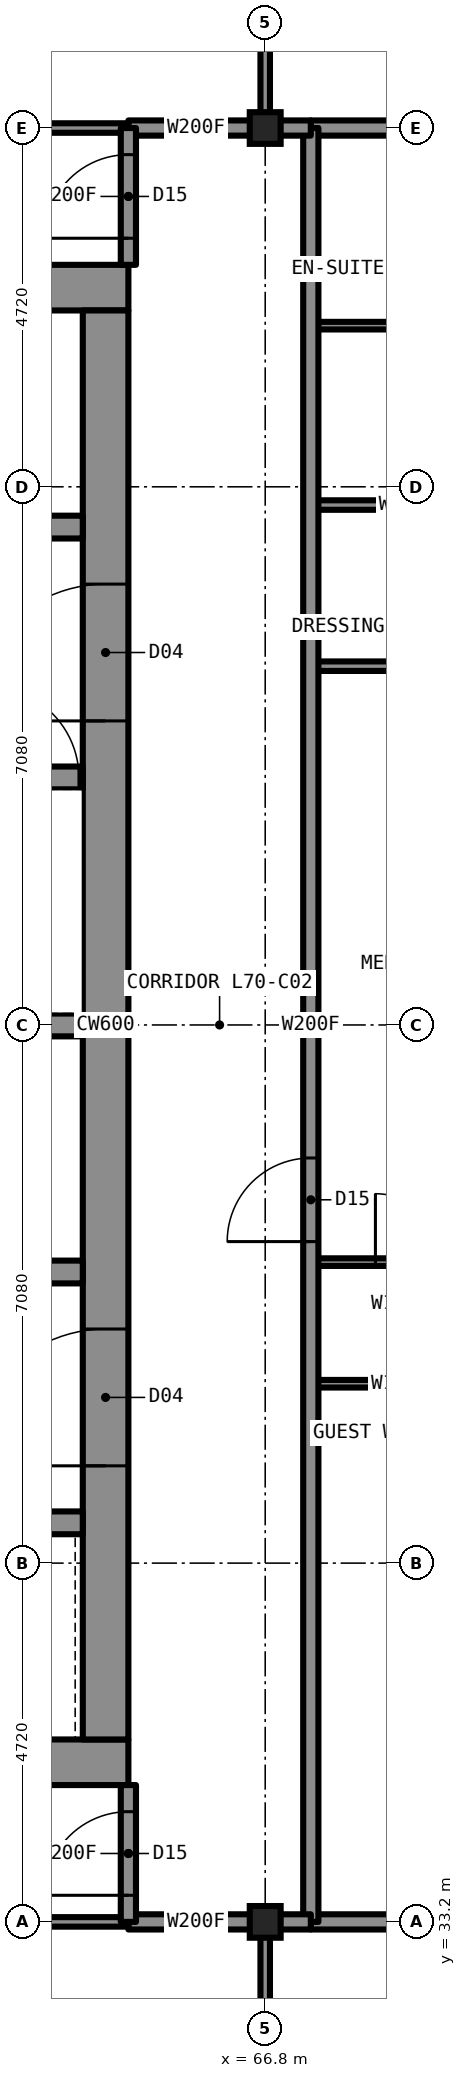
"""IFC4 building model, lengths in metres.
Left out: names, types, materials, properties, quantities, classifications, styles, units other than length and angle.
Written with IfcOpenShell. Run it as: python <this file> out.ifc"""

import sys

from ifc_helpers import new_model, si_unit, direction, frame, frame_2d, origin, origin_2d, place, context, subcontext, project, spatial, rectangle, i_section, extrude, element, fill, save


model = new_model("IFC4")
c1 = context("Model", 3, precision=1e-05, world=origin(), true_north=direction((0.0, 1.0)))
c2 = subcontext(c1, "Body", "Model", "MODEL_VIEW")
j1 = project(units=[si_unit("LENGTHUNIT", "METRE"), si_unit("PLANEANGLEUNIT", "RADIAN")], contexts=[c1])
p1 = place(None, origin())
s1 = spatial("IfcSite", under=j1, at=p1, CompositionType="ELEMENT")
p2 = place(p1, origin())
s2 = spatial("IfcBuilding", under=s1, at=p2, CompositionType="ELEMENT")
p3 = place(p2, frame((0.0, 0.0, 254.7)))
s3 = spatial("IfcBuildingStorey", under=s2, at=p3, CompositionType="ELEMENT", Elevation=254.7)
for number, where, z_axis, x_axis in (
    (1, (66.8, 33.2, 0.0), (0.0, 0.0, 1.0), (1.0, 0.0, 0.0)),
    (2, (66.8, 56.8, 0.0), (0.0, 0.0, 1.0), (1.0, 0.0, 0.0)),
):
    element("IfcColumn", number, at=place(p3, frame(where, z_axis=z_axis, x_axis=x_axis)), inside=s3, PredefinedType="COLUMN", context=c2, shape_type="SweptSolid", body=[
        extrude(i_section(OverallWidth=0.406, OverallDepth=0.417, WebThickness=0.03, FlangeThickness=0.048, at=origin_2d()), origin(), (0.0, 0.0, 1.0), 3.5),
    ])
for number, where, z_axis, x_axis in (
    (3, (45.0, 54.7, 0.0), (0.0, 0.0, 1.0), (1.0, 0.0, 0.0)),
    (4, (45.0, 35.3, 0.0), (0.0, 0.0, 1.0), (1.0, 0.0, 0.0)),
):
    element("IfcWall", number, at=place(p3, frame(where, z_axis=z_axis, x_axis=x_axis)), inside=s3, PredefinedType="SHEAR", context=c2, shape_type="SweptSolid", body=[
        extrude(rectangle(XDim=20.0, YDim=0.6, at=frame_2d((10.0, 0.0))), origin(), (0.0, 0.0, 1.0), 3.5),
    ])
p4 = place(p3, frame((64.7, 35.6, 0.0), z_axis=(0.0, 0.0, 1.0), x_axis=(0.0, 1.0, 0.0)))
e5 = element("IfcWall", 5, at=p4, inside=s3, PredefinedType="SHEAR", context=c2, shape_type="SweptSolid", body=[
    extrude(rectangle(XDim=18.8, YDim=0.6, at=frame_2d((9.4, 0.0))), origin(), (0.0, 0.0, 1.0), 3.5),
])
p5 = place(p4, frame((13.4, 0.0, 0.0)))
e6 = element("IfcOpeningElement", 6, at=p5, cuts=e5, PredefinedType="OPENING", context=c2, shape_type="SweptSolid", body=[
    extrude(rectangle(XDim=1.8, YDim=2.2, at=frame_2d((0.9, 1.1))), frame((0.0, 0.31, 0.0), z_axis=(0.0, -1.0, 0.0), x_axis=(1.0, 0.0, 0.0)), (0.0, 0.0, 1.0), 0.62),
])
p6 = place(p4, frame((3.6, 0.0, 0.0)))
e7 = element("IfcOpeningElement", 7, at=p6, cuts=e5, PredefinedType="OPENING", context=c2, shape_type="SweptSolid", body=[
    extrude(rectangle(XDim=1.8, YDim=2.2, at=frame_2d((0.9, 1.1))), frame((0.0, 0.31, 0.0), z_axis=(0.0, -1.0, 0.0), x_axis=(1.0, 0.0, 0.0)), (0.0, 0.0, 1.0), 0.62),
])
p7 = place(p3, frame((45.6, 51.55, 0.0), z_axis=(0.0, 0.0, 1.0), x_axis=(1.0, 0.0, 0.0)))
e8 = element("IfcWall", 8, at=p7, inside=s3, PredefinedType="SHEAR", context=c2, shape_type="SweptSolid", body=[
    extrude(rectangle(XDim=18.8, YDim=0.3, at=frame_2d((9.4, 0.0))), origin(), (0.0, 0.0, 1.0), 3.5),
])
p8 = place(p7, frame((4.8, 0.0, 0.0)))
e9 = element("IfcOpeningElement", 9, at=p8, cuts=e8, PredefinedType="OPENING", context=c2, shape_type="SweptSolid", body=[
    extrude(rectangle(XDim=1.0, YDim=2.1, at=frame_2d((0.5, 1.05))), frame((0.0, 0.16, 0.0), z_axis=(0.0, -1.0, 0.0), x_axis=(1.0, 0.0, 0.0)), (0.0, 0.0, 1.0), 0.32),
])
p9 = place(p7, frame((11.6, 0.0, 0.0)))
e10 = element("IfcOpeningElement", 10, at=p9, cuts=e8, PredefinedType="OPENING", context=c2, shape_type="SweptSolid", body=[
    extrude(rectangle(XDim=1.1, YDim=2.2, at=frame_2d((0.55, 1.1))), frame((0.0, 0.16, 0.0), z_axis=(0.0, -1.0, 0.0), x_axis=(1.0, 0.0, 0.0)), (0.0, 0.0, 1.0), 0.32),
])
p10 = place(p7, frame((14.3, 0.0, 0.0)))
e11 = element("IfcOpeningElement", 11, at=p10, cuts=e8, PredefinedType="OPENING", context=c2, shape_type="SweptSolid", body=[
    extrude(rectangle(XDim=1.1, YDim=2.2, at=frame_2d((0.55, 1.1))), frame((0.0, 0.16, 0.0), z_axis=(0.0, -1.0, 0.0), x_axis=(1.0, 0.0, 0.0)), (0.0, 0.0, 1.0), 0.32),
])
p11 = place(p3, frame((45.6, 38.45, 0.0), z_axis=(0.0, 0.0, 1.0), x_axis=(1.0, 0.0, 0.0)))
e12 = element("IfcWall", 12, at=p11, inside=s3, PredefinedType="SHEAR", context=c2, shape_type="SweptSolid", body=[
    extrude(rectangle(XDim=18.8, YDim=0.3, at=frame_2d((9.4, 0.0))), origin(), (0.0, 0.0, 1.0), 3.5),
])
p12 = place(p11, frame((0.7, 0.0, 0.0)))
e13 = element("IfcOpeningElement", 13, at=p12, cuts=e12, PredefinedType="OPENING", context=c2, shape_type="SweptSolid", body=[
    extrude(rectangle(XDim=1.1, YDim=2.2, at=frame_2d((0.55, 1.1))), frame((0.0, 0.16, 0.0), z_axis=(0.0, -1.0, 0.0), x_axis=(1.0, 0.0, 0.0)), (0.0, 0.0, 1.0), 0.32),
])
p13 = place(p11, frame((3.4, 0.0, 0.0)))
e14 = element("IfcOpeningElement", 14, at=p13, cuts=e12, PredefinedType="OPENING", context=c2, shape_type="SweptSolid", body=[
    extrude(rectangle(XDim=1.1, YDim=2.2, at=frame_2d((0.55, 1.1))), frame((0.0, 0.16, 0.0), z_axis=(0.0, -1.0, 0.0), x_axis=(1.0, 0.0, 0.0)), (0.0, 0.0, 1.0), 0.32),
])
p14 = place(p11, frame((6.1, 0.0, 0.0)))
e15 = element("IfcOpeningElement", 15, at=p14, cuts=e12, PredefinedType="OPENING", context=c2, shape_type="SweptSolid", body=[
    extrude(rectangle(XDim=1.1, YDim=2.2, at=frame_2d((0.55, 1.1))), frame((0.0, 0.16, 0.0), z_axis=(0.0, -1.0, 0.0), x_axis=(1.0, 0.0, 0.0)), (0.0, 0.0, 1.0), 0.32),
])
p15 = place(p11, frame((8.8, 0.0, 0.0)))
e16 = element("IfcOpeningElement", 16, at=p15, cuts=e12, PredefinedType="OPENING", context=c2, shape_type="SweptSolid", body=[
    extrude(rectangle(XDim=1.1, YDim=2.2, at=frame_2d((0.55, 1.1))), frame((0.0, 0.16, 0.0), z_axis=(0.0, -1.0, 0.0), x_axis=(1.0, 0.0, 0.0)), (0.0, 0.0, 1.0), 0.32),
])
p16 = place(p3, frame((56.2, 48.25, 0.0), z_axis=(0.0, 0.0, 1.0), x_axis=(1.0, 0.0, 0.0)))
e17 = element("IfcWall", 17, at=p16, inside=s3, PredefinedType="SHEAR", context=c2, shape_type="SweptSolid", body=[
    extrude(rectangle(XDim=8.2, YDim=0.3, at=frame_2d((4.1, 0.0))), origin(), (0.0, 0.0, 1.0), 3.5),
])
p17 = place(p16, frame((6.95, 0.0, 0.0)))
e18 = element("IfcOpeningElement", 18, at=p17, cuts=e17, PredefinedType="OPENING", context=c2, shape_type="SweptSolid", body=[
    extrude(rectangle(XDim=1.2, YDim=2.2, at=frame_2d((0.6, 1.1))), frame((0.0, 0.16, 0.0), z_axis=(0.0, -1.0, 0.0), x_axis=(1.0, 0.0, 0.0)), (0.0, 0.0, 1.0), 0.32),
])
p18 = place(p3, frame((56.2, 41.75, 0.0), z_axis=(0.0, 0.0, 1.0), x_axis=(1.0, 0.0, 0.0)))
e19 = element("IfcWall", 19, at=p18, inside=s3, PredefinedType="SHEAR", context=c2, shape_type="SweptSolid", body=[
    extrude(rectangle(XDim=8.2, YDim=0.3, at=frame_2d((4.1, 0.0))), origin(), (0.0, 0.0, 1.0), 3.5),
])
p19 = place(p18, frame((3.3, 0.0, 0.0)))
e20 = element("IfcOpeningElement", 20, at=p19, cuts=e19, PredefinedType="OPENING", context=c2, shape_type="SweptSolid", body=[
    extrude(rectangle(XDim=1.0, YDim=2.1, at=frame_2d((0.5, 1.05))), frame((0.0, 0.16, 0.0), z_axis=(0.0, -1.0, 0.0), x_axis=(1.0, 0.0, 0.0)), (0.0, 0.0, 1.0), 0.32),
])
p20 = place(p3, frame((56.5, 45.0, 0.0), z_axis=(0.0, 0.0, 1.0), x_axis=(1.0, 0.0, 0.0)))
e21 = element("IfcWall", 21, at=p20, inside=s3, PredefinedType="SHEAR", context=c2, shape_type="SweptSolid", body=[
    extrude(rectangle(XDim=7.9, YDim=0.3, at=frame_2d((3.95, 0.0))), origin(), (0.0, 0.0, 1.0), 3.5),
])
p21 = place(p3, frame((65.0, 33.2, 0.0), z_axis=(0.0, 0.0, 1.0), x_axis=(1.0, 0.0, 0.0)))
e22 = element("IfcWall", 22, at=p21, inside=s3, PredefinedType="PARTITIONING", context=c2, shape_type="SweptSolid", body=[
    extrude(rectangle(XDim=1.78, YDim=0.2, at=frame_2d((0.89, 0.0))), origin(), (0.0, 0.0, 1.0), 3.33),
])
p22 = place(p3, frame((67.4, 33.2, 0.0), z_axis=(0.0, 0.0, 1.0), x_axis=(1.0, 0.0, 0.0)))
e23 = element("IfcWall", 23, at=p22, inside=s3, PredefinedType="PARTITIONING", context=c2, shape_type="SweptSolid", body=[
    extrude(rectangle(XDim=5.3, YDim=0.2, at=frame_2d((2.65, 0.0))), origin(), (0.0, 0.0, 1.0), 2.573),
])
p23 = place(p3, frame((62.08, 33.2, 0.0), z_axis=(0.0, 0.0, 1.0), x_axis=(1.0, 0.0, 0.0)))
e24 = element("IfcWall", 24, at=p23, inside=s3, PredefinedType="PARTITIONING", context=c2, shape_type="SweptSolid", body=[
    extrude(rectangle(XDim=2.92, YDim=0.125, at=frame_2d((1.46, 0.0))), origin(), (0.0, 0.0, 1.0), 3.33),
])
p24 = place(p3, frame((67.4, 41.88, 0.0), z_axis=(0.0, 0.0, 1.0), x_axis=(1.0, 0.0, 0.0)))
e25 = element("IfcWall", 25, at=p24, inside=s3, PredefinedType="PARTITIONING", context=c2, shape_type="SweptSolid", body=[
    extrude(rectangle(XDim=2.2, YDim=0.1, at=frame_2d((1.1, 0.0))), origin(), (0.0, 0.0, 1.0), 3.33),
])
p25 = place(p24, frame((0.85, 0.0, 0.0)))
e26 = element("IfcOpeningElement", 26, at=p25, cuts=e25, PredefinedType="OPENING", context=c2, shape_type="SweptSolid", body=[
    extrude(rectangle(XDim=0.9, YDim=2.1, at=frame_2d((0.45, 1.05))), frame((0.0, 0.06, 0.0), z_axis=(0.0, -1.0, 0.0), x_axis=(1.0, 0.0, 0.0)), (0.0, 0.0, 1.0), 0.12),
])
p26 = place(p3, frame((67.4, 40.28, 0.0), z_axis=(0.0, 0.0, 1.0), x_axis=(1.0, 0.0, 0.0)))
e27 = element("IfcWall", 27, at=p26, inside=s3, PredefinedType="PARTITIONING", context=c2, shape_type="SweptSolid", body=[
    extrude(rectangle(XDim=2.2, YDim=0.1, at=frame_2d((1.1, 0.0))), origin(), (0.0, 0.0, 1.0), 2.797),
])
p27 = place(p3, frame((65.0, 56.8, 0.0), z_axis=(0.0, 0.0, 1.0), x_axis=(1.0, 0.0, 0.0)))
e28 = element("IfcWall", 28, at=p27, inside=s3, PredefinedType="PARTITIONING", context=c2, shape_type="SweptSolid", body=[
    extrude(rectangle(XDim=1.78, YDim=0.2, at=frame_2d((0.89, 0.0))), origin(), (0.0, 0.0, 1.0), 3.33),
])
p28 = place(p3, frame((67.4, 56.8, 0.0), z_axis=(0.0, 0.0, 1.0), x_axis=(1.0, 0.0, 0.0)))
e29 = element("IfcWall", 29, at=p28, inside=s3, PredefinedType="PARTITIONING", context=c2, shape_type="SweptSolid", body=[
    extrude(rectangle(XDim=5.3, YDim=0.2, at=frame_2d((2.65, 0.0))), origin(), (0.0, 0.0, 1.0), 2.573),
])
p29 = place(p3, frame((62.08, 56.8, 0.0), z_axis=(0.0, 0.0, 1.0), x_axis=(1.0, 0.0, 0.0)))
e30 = element("IfcWall", 30, at=p29, inside=s3, PredefinedType="PARTITIONING", context=c2, shape_type="SweptSolid", body=[
    extrude(rectangle(XDim=2.92, YDim=0.125, at=frame_2d((1.46, 0.0))), origin(), (0.0, 0.0, 1.0), 3.33),
])
p30 = place(p3, frame((67.4, 49.72, 0.0), z_axis=(0.0, 0.0, 1.0), x_axis=(1.0, 0.0, 0.0)))
e31 = element("IfcWall", 31, at=p30, inside=s3, PredefinedType="PARTITIONING", context=c2, shape_type="SweptSolid", body=[
    extrude(rectangle(XDim=5.3, YDim=0.125, at=frame_2d((2.65, 0.0))), origin(), (0.0, 0.0, 1.0), 2.797),
])
p31 = place(p30, frame((3.55, 0.0, 0.0)))
e32 = element("IfcOpeningElement", 32, at=p31, cuts=e31, PredefinedType="OPENING", context=c2, shape_type="SweptSolid", body=[
    extrude(rectangle(XDim=0.9, YDim=2.2, at=frame_2d((0.45, 1.1))), frame((0.0, 0.073, 0.0), z_axis=(0.0, -1.0, 0.0), x_axis=(1.0, 0.0, 0.0)), (0.0, 0.0, 1.0), 0.145),
])
p32 = place(p3, frame((67.4, 51.84, 0.0), z_axis=(0.0, 0.0, 1.0), x_axis=(1.0, 0.0, 0.0)))
e33 = element("IfcWall", 33, at=p32, inside=s3, PredefinedType="PARTITIONING", context=c2, shape_type="SweptSolid", body=[
    extrude(rectangle(XDim=2.4, YDim=0.125, at=frame_2d((1.2, 0.0))), origin(), (0.0, 0.0, 1.0), 3.33),
])
p33 = place(p3, frame((67.4, 54.2, 0.0), z_axis=(0.0, 0.0, 1.0), x_axis=(1.0, 0.0, 0.0)))
e34 = element("IfcWall", 34, at=p33, inside=s3, PredefinedType="PARTITIONING", context=c2, shape_type="SweptSolid", body=[
    extrude(rectangle(XDim=3.0, YDim=0.1, at=frame_2d((1.5, 0.0))), origin(), (0.0, 0.0, 1.0), 3.33),
])
p34 = place(p3, frame((65.0, 33.2, 0.0), z_axis=(0.0, 0.0, 1.0), x_axis=(0.0, 1.0, 0.0)))
e35 = element("IfcWall", 35, at=p34, inside=s3, PredefinedType="PARTITIONING", context=c2, shape_type="SweptSolid", body=[
    extrude(rectangle(XDim=1.8, YDim=0.2, at=frame_2d((0.9, 0.0))), origin(), (0.0, 0.0, 1.0), 3.33),
])
p35 = place(p34, frame((0.35, 0.0, 0.0)))
e36 = element("IfcOpeningElement", 36, at=p35, cuts=e35, PredefinedType="OPENING", context=c2, shape_type="SweptSolid", body=[
    extrude(rectangle(XDim=1.1, YDim=2.2, at=frame_2d((0.55, 1.1))), frame((0.0, 0.11, 0.0), z_axis=(0.0, -1.0, 0.0), x_axis=(1.0, 0.0, 0.0)), (0.0, 0.0, 1.0), 0.22),
])
p36 = place(p3, frame((65.0, 55.0, 0.0), z_axis=(0.0, 0.0, 1.0), x_axis=(0.0, 1.0, 0.0)))
e37 = element("IfcWall", 37, at=p36, inside=s3, PredefinedType="PARTITIONING", context=c2, shape_type="SweptSolid", body=[
    extrude(rectangle(XDim=1.8, YDim=0.2, at=frame_2d((0.9, 0.0))), origin(), (0.0, 0.0, 1.0), 3.33),
])
p37 = place(p36, frame((0.35, 0.0, 0.0)))
e38 = element("IfcOpeningElement", 38, at=p37, cuts=e37, PredefinedType="OPENING", context=c2, shape_type="SweptSolid", body=[
    extrude(rectangle(XDim=1.1, YDim=2.2, at=frame_2d((0.55, 1.1))), frame((0.0, 0.11, 0.0), z_axis=(0.0, -1.0, 0.0), x_axis=(1.0, 0.0, 0.0)), (0.0, 0.0, 1.0), 0.22),
])
p38 = place(p3, frame((66.8, 27.3, 0.0), z_axis=(0.0, 0.0, 1.0), x_axis=(0.0, 1.0, 0.0)))
e39 = element("IfcWall", 39, at=p38, inside=s3, PredefinedType="PARTITIONING", context=c2, shape_type="SweptSolid", body=[
    extrude(rectangle(XDim=5.9, YDim=0.125, at=frame_2d((2.95, 0.0))), origin(), (0.0, 0.0, 1.0), 2.573),
])
p39 = place(p38, frame((1.45, 0.0, 0.0)))
e40 = element("IfcOpeningElement", 40, at=p39, cuts=e39, PredefinedType="OPENING", context=c2, shape_type="SweptSolid", body=[
    extrude(rectangle(XDim=0.9, YDim=2.2, at=frame_2d((0.45, 1.1))), frame((0.0, 0.073, 0.0), z_axis=(0.0, -1.0, 0.0), x_axis=(1.0, 0.0, 0.0)), (0.0, 0.0, 1.0), 0.145),
])
p40 = place(p3, frame((66.8, 56.8, 0.0), z_axis=(0.0, 0.0, 1.0), x_axis=(0.0, 1.0, 0.0)))
e41 = element("IfcWall", 41, at=p40, inside=s3, PredefinedType="PARTITIONING", context=c2, shape_type="SweptSolid", body=[
    extrude(rectangle(XDim=5.9, YDim=0.125, at=frame_2d((2.95, 0.0))), origin(), (0.0, 0.0, 1.0), 2.573),
])
p41 = place(p40, frame((3.55, 0.0, 0.0)))
e42 = element("IfcOpeningElement", 42, at=p41, cuts=e41, PredefinedType="OPENING", context=c2, shape_type="SweptSolid", body=[
    extrude(rectangle(XDim=0.9, YDim=2.2, at=frame_2d((0.45, 1.1))), frame((0.0, 0.073, 0.0), z_axis=(0.0, -1.0, 0.0), x_axis=(1.0, 0.0, 0.0)), (0.0, 0.0, 1.0), 0.145),
])
p42 = place(p3, frame((67.4, 33.2, 0.0), z_axis=(0.0, 0.0, 1.0), x_axis=(0.0, 1.0, 0.0)))
e43 = element("IfcWall", 43, at=p42, inside=s3, PredefinedType="PARTITIONING", context=c2, shape_type="SweptSolid", body=[
    extrude(rectangle(XDim=23.6, YDim=0.2, at=frame_2d((11.8, 0.0))), origin(), (0.0, 0.0, 1.0), 3.33),
])
p43 = place(p42, frame((8.95, 0.0, 0.0)))
e44 = element("IfcOpeningElement", 44, at=p43, cuts=e43, PredefinedType="OPENING", context=c2, shape_type="SweptSolid", body=[
    extrude(rectangle(XDim=1.1, YDim=2.2, at=frame_2d((0.55, 1.1))), frame((0.0, 0.11, 0.0), z_axis=(0.0, -1.0, 0.0), x_axis=(1.0, 0.0, 0.0)), (0.0, 0.0, 1.0), 0.22),
])
for number, where, z_axis, x_axis in (
    (45, (66.78, 33.2, 0.0), (0.0, 0.0, 1.0), (1.0, 0.0, 0.0)),
    (46, (66.78, 56.8, 0.0), (0.0, 0.0, 1.0), (1.0, 0.0, 0.0)),
):
    element("IfcWall", number, at=place(p3, frame(where, z_axis=z_axis, x_axis=x_axis)), inside=s3, PredefinedType="PARTITIONING", context=c2, shape_type="SweptSolid", body=[
        extrude(rectangle(XDim=0.62, YDim=0.2, at=frame_2d((0.31, 0.0))), origin(), (0.0, 0.0, 1.0), 2.573),
    ])
p44 = place(p37, origin())
e47 = element("IfcDoor", 47, at=p44, inside=s3, OperationType="SINGLE_SWING_LEFT", PredefinedType="DOOR", context=c2, shape_type="SweptSolid", body=[
    extrude(rectangle(XDim=1.1, YDim=2.2, at=frame_2d((0.55, 1.1))), frame((0.0, 0.025, 0.0), z_axis=(0.0, -1.0, 0.0), x_axis=(1.0, 0.0, 0.0)), (0.0, 0.0, 1.0), 0.05),
])
fill(e38, e47)
p45 = place(p35, origin())
e48 = element("IfcDoor", 48, at=p45, inside=s3, OperationType="SINGLE_SWING_LEFT", PredefinedType="DOOR", context=c2, shape_type="SweptSolid", body=[
    extrude(rectangle(XDim=1.1, YDim=2.2, at=frame_2d((0.55, 1.1))), frame((0.0, 0.025, 0.0), z_axis=(0.0, -1.0, 0.0), x_axis=(1.0, 0.0, 0.0)), (0.0, 0.0, 1.0), 0.05),
])
fill(e36, e48)
p46 = place(p43, origin())
e49 = element("IfcDoor", 49, at=p46, inside=s3, OperationType="SINGLE_SWING_LEFT", PredefinedType="DOOR", context=c2, shape_type="SweptSolid", body=[
    extrude(rectangle(XDim=1.1, YDim=2.2, at=frame_2d((0.55, 1.1))), frame((0.0, 0.025, 0.0), z_axis=(0.0, -1.0, 0.0), x_axis=(1.0, 0.0, 0.0)), (0.0, 0.0, 1.0), 0.05),
])
fill(e44, e49)
p47 = place(p25, origin())
e50 = element("IfcDoor", 50, at=p47, inside=s3, OperationType="SINGLE_SWING_LEFT", PredefinedType="DOOR", context=c2, shape_type="SweptSolid", body=[
    extrude(rectangle(XDim=0.9, YDim=2.1, at=frame_2d((0.45, 1.05))), frame((0.0, 0.025, 0.0), z_axis=(0.0, -1.0, 0.0), x_axis=(1.0, 0.0, 0.0)), (0.0, 0.0, 1.0), 0.05),
])
fill(e26, e50)
p48 = place(p5, origin())
e51 = element("IfcDoor", 51, at=p48, inside=s3, OperationType="DOUBLE_DOOR_SINGLE_SWING", PredefinedType="DOOR", context=c2, shape_type="SweptSolid", body=[
    extrude(rectangle(XDim=1.8, YDim=2.2, at=frame_2d((0.9, 1.1))), frame((0.0, 0.025, 0.0), z_axis=(0.0, -1.0, 0.0), x_axis=(1.0, 0.0, 0.0)), (0.0, 0.0, 1.0), 0.05),
])
fill(e6, e51)
p49 = place(p6, origin())
e52 = element("IfcDoor", 52, at=p49, inside=s3, OperationType="DOUBLE_DOOR_SINGLE_SWING", PredefinedType="DOOR", context=c2, shape_type="SweptSolid", body=[
    extrude(rectangle(XDim=1.8, YDim=2.2, at=frame_2d((0.9, 1.1))), frame((0.0, 0.025, 0.0), z_axis=(0.0, -1.0, 0.0), x_axis=(1.0, 0.0, 0.0)), (0.0, 0.0, 1.0), 0.05),
])
fill(e7, e52)
p50 = place(p17, origin())
e53 = element("IfcDoor", 53, at=p50, inside=s3, OperationType="SINGLE_SWING_LEFT", PredefinedType="DOOR", context=c2, shape_type="SweptSolid", body=[
    extrude(rectangle(XDim=1.2, YDim=2.2, at=frame_2d((0.6, 1.1))), frame((0.0, 0.025, 0.0), z_axis=(0.0, -1.0, 0.0), x_axis=(1.0, 0.0, 0.0)), (0.0, 0.0, 1.0), 0.05),
])
fill(e18, e53)
save(model, sys.argv[1])
